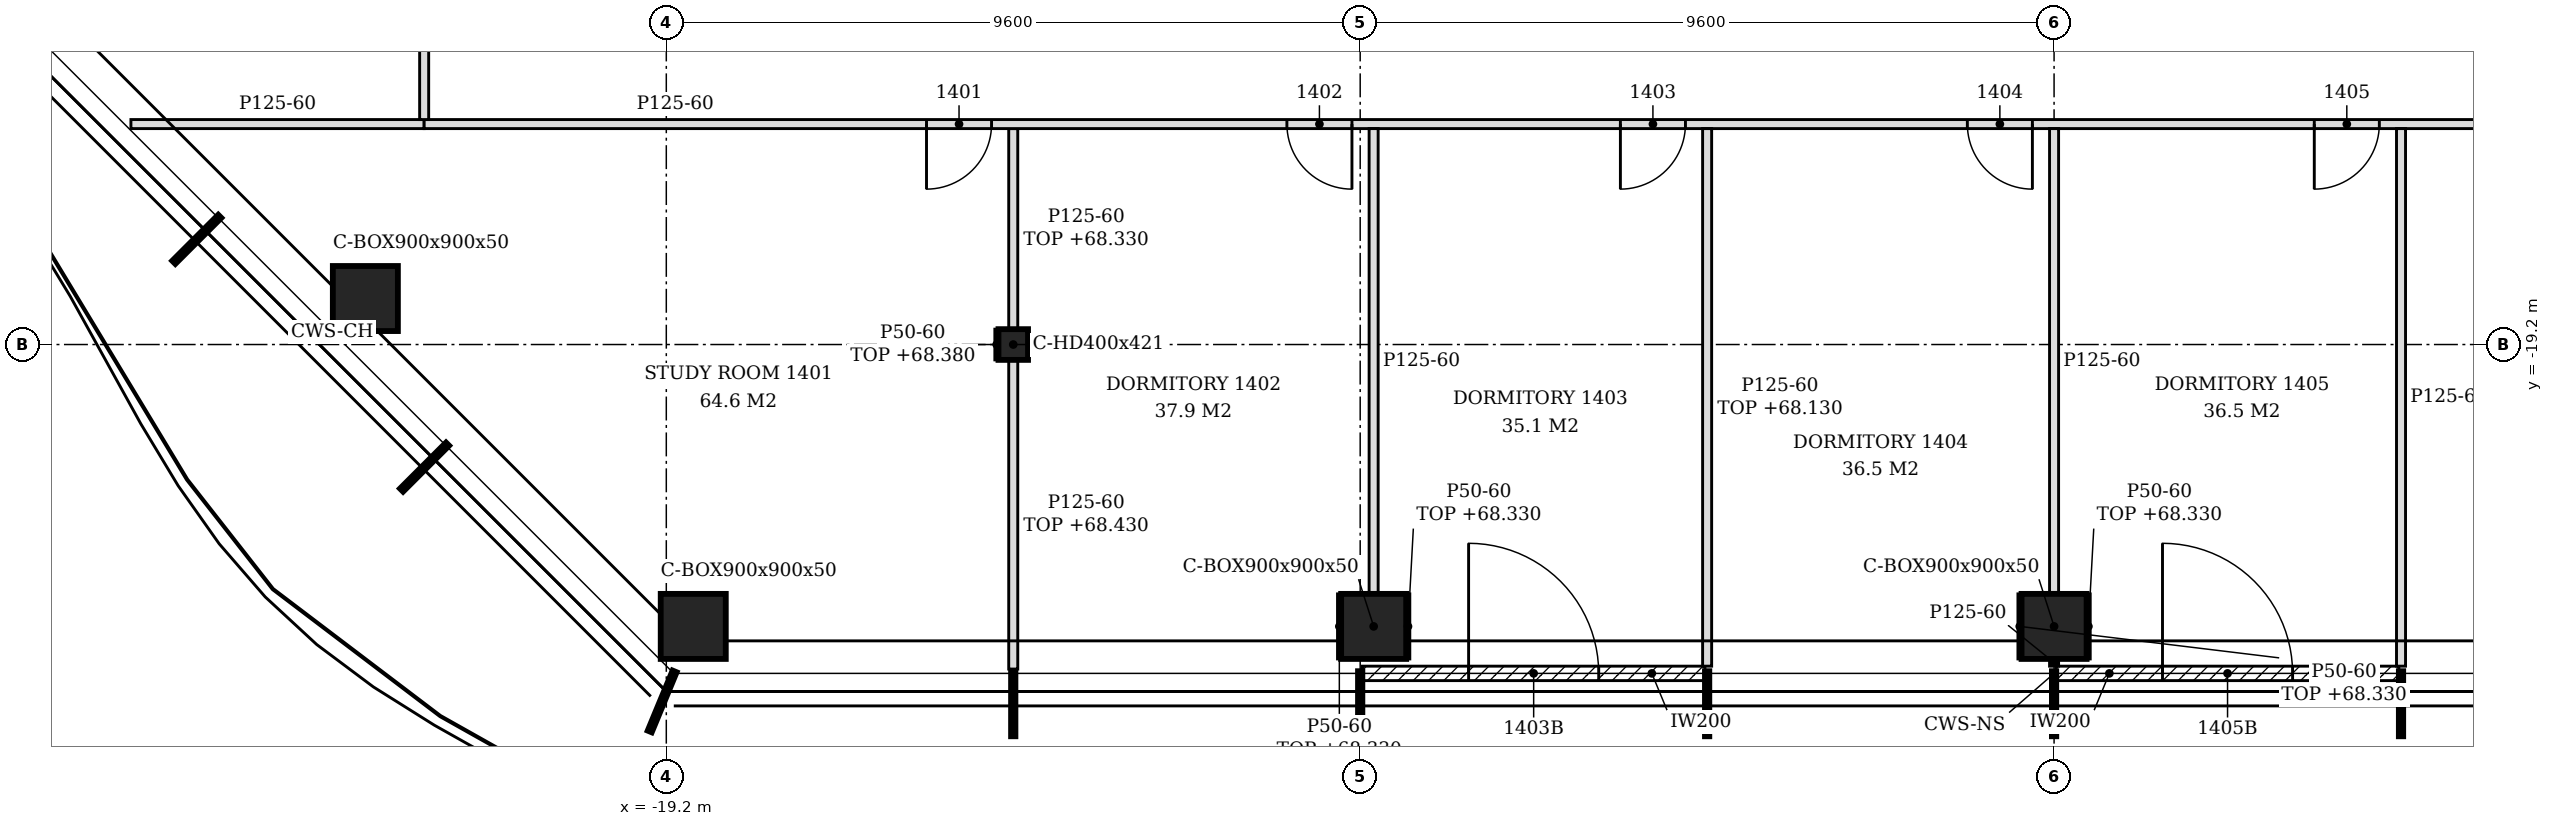
"""IFC4 building model, lengths in metres.
Left out: names, types, materials, properties, quantities, classifications, styles, units other than length and angle.
Written with IfcOpenShell. Run it as: python <this file> out.ifc"""

import sys

from ifc_helpers import new_model, si_unit, direction, frame, frame_2d, origin, origin_2d, place, context, subcontext, project, spatial, polyline, rectangle, hollow_rectangle, i_section, outline, extrude, element, fill, save


model = new_model("IFC4")
c1 = context("Model", 3, precision=1e-05, world=origin(), true_north=direction((0.0, 1.0)))
c2 = subcontext(c1, "Body", "Model", "MODEL_VIEW")
j1 = project(units=[si_unit("LENGTHUNIT", "METRE"), si_unit("PLANEANGLEUNIT", "RADIAN")], contexts=[c1])
p1 = place(None, origin())
s1 = spatial("IfcSite", under=j1, at=p1, CompositionType="ELEMENT")
p2 = place(p1, origin())
s2 = spatial("IfcBuilding", under=s1, at=p2, CompositionType="ELEMENT")
p3 = place(p2, frame((0.0, 0.0, 65.4)))
s3 = spatial("IfcBuildingStorey", under=s2, at=p3, CompositionType="ELEMENT", Elevation=65.4)
for number, where, z_axis, x_axis in (
    (1, (-18.827, -23.1, -0.15), (0.0, 0.0, 1.0), (1.0, 0.0, 0.0)),
    (2, (-9.414, -23.1, -0.15), (0.0, 0.0, 1.0), (1.0, 0.0, 0.0)),
    (3, (0.0, -23.1, -0.15), (0.0, 0.0, 1.0), (1.0, 0.0, 0.0)),
    (4, (-23.364, -18.564, -0.15), (0.0, 0.0, 1.0), (1.0, 0.0, 0.0)),
):
    element("IfcColumn", number, at=place(p3, frame(where, z_axis=z_axis, x_axis=x_axis)), inside=s3, PredefinedType="COLUMN", context=c2, shape_type="SweptSolid", body=[
        extrude(hollow_rectangle(XDim=0.9, YDim=0.9, WallThickness=0.05, at=origin_2d()), origin(), (0.0, 0.0, 1.0), 3.6),
    ])
p4 = place(p3, frame((-14.4, -19.2, -0.15), z_axis=(0.0, 0.0, 1.0), x_axis=(1.0, 0.0, 0.0)))
e5 = element("IfcColumn", 5, at=p4, inside=s3, PredefinedType="COLUMN", context=c2, shape_type="SweptSolid", body=[
    extrude(i_section(OverallWidth=0.409, OverallDepth=0.425, WebThickness=0.033, FlangeThickness=0.052, FilletRadius=0.015, at=origin_2d()), origin(), (0.0, 0.0, 1.0), 3.6),
])
p5 = place(p3, frame((-9.57, -23.75, 0.0), z_axis=(0.0, 0.0, 1.0), x_axis=(1.0, 0.0, 0.0)))
e6 = element("IfcWall", 6, at=p5, inside=s3, PredefinedType="NOTDEFINED", context=c2, shape_type="SweptSolid", body=[
    extrude(rectangle(XDim=4.74, YDim=0.2, at=frame_2d((2.37, 0.0))), origin(), (0.0, 0.0, 1.0), 3.45),
])
p6 = place(p5, frame((1.47, 0.0, 0.0)))
e7 = element("IfcOpeningElement", 7, at=p6, cuts=e6, PredefinedType="OPENING", context=c2, shape_type="SweptSolid", body=[
    extrude(rectangle(XDim=1.8, YDim=2.4, at=frame_2d((0.9, 1.2))), frame((0.0, 0.11, 0.0), z_axis=(0.0, -1.0, 0.0), x_axis=(1.0, 0.0, 0.0)), (0.0, 0.0, 1.0), 0.22),
])
p7 = place(p3, frame((0.03, -23.75, 0.0), z_axis=(0.0, 0.0, 1.0), x_axis=(1.0, 0.0, 0.0)))
e8 = element("IfcWall", 8, at=p7, inside=s3, PredefinedType="NOTDEFINED", context=c2, shape_type="SweptSolid", body=[
    extrude(rectangle(XDim=4.74, YDim=0.2, at=frame_2d((2.37, 0.0))), origin(), (0.0, 0.0, 1.0), 3.45),
])
p8 = place(p7, frame((1.47, 0.0, 0.0)))
e9 = element("IfcOpeningElement", 9, at=p8, cuts=e8, PredefinedType="OPENING", context=c2, shape_type="SweptSolid", body=[
    extrude(rectangle(XDim=1.8, YDim=2.4, at=frame_2d((0.9, 1.2))), frame((0.0, 0.11, 0.0), z_axis=(0.0, -1.0, 0.0), x_axis=(1.0, 0.0, 0.0)), (0.0, 0.0, 1.0), 0.22),
])
p9 = place(p3, frame((-14.4, -23.69, 0.0), z_axis=(0.0, 0.0, 1.0), x_axis=(0.0, 1.0, 0.0)))
e10 = element("IfcWall", 10, at=p9, inside=s3, PredefinedType="PARTITIONING", context=c2, shape_type="SweptSolid", body=[
    extrude(outline(polyline([(0.0, 0.0), (4.277, 0.0), (4.278, 3.03), (0.74, 3.03), (0.738, 2.93), (0.44, 2.93), (0.438, 3.03), (0.0, 3.03), (0.0, 0.0)])), frame((0.0, 0.062, 0.0), z_axis=(0.0, -1.0, 0.0), x_axis=(1.0, 0.0, 0.0)), (0.0, 0.0, 1.0), 0.125),
])
p10 = place(p3, frame((-4.8, -23.65, 0.0), z_axis=(0.0, 0.0, 1.0), x_axis=(0.0, 1.0, 0.0)))
e11 = element("IfcWall", 11, at=p10, inside=s3, PredefinedType="PARTITIONING", context=c2, shape_type="SweptSolid", body=[
    extrude(rectangle(XDim=7.438, YDim=0.125, at=frame_2d((3.719, 0.0))), origin(), (0.0, 0.0, 1.0), 2.73),
])
p11 = place(p3, frame((0.0, -23.65, 0.0), z_axis=(0.0, 0.0, 1.0), x_axis=(0.0, 1.0, 0.0)))
e12 = element("IfcWall", 12, at=p11, inside=s3, PredefinedType="PARTITIONING", context=c2, shape_type="SweptSolid", body=[
    extrude(rectangle(XDim=0.1, YDim=0.125, at=frame_2d((0.05, 0.0))), origin(), (0.0, 0.0, 1.0), 3.45),
])
p12 = place(p3, frame((4.8, -23.65, 0.0), z_axis=(0.0, 0.0, 1.0), x_axis=(0.0, 1.0, 0.0)))
e13 = element("IfcWall", 13, at=p12, inside=s3, PredefinedType="PARTITIONING", context=c2, shape_type="SweptSolid", body=[
    extrude(outline(polyline([(0.0, 0.0), (7.438, 0.0), (7.438, 3.45), (4.555, 3.45), (4.553, 2.88), (4.345, 2.88), (4.343, 3.45), (0.7, 3.45), (0.698, 2.93), (0.4, 2.93), (0.398, 3.45), (0.0, 3.45), (0.0, 0.0)])), frame((0.0, 0.062, 0.0), z_axis=(0.0, -1.0, 0.0), x_axis=(1.0, 0.0, 0.0)), (0.0, 0.0, 1.0), 0.125),
])
p13 = place(p3, frame((0.0, -22.65, 0.0), z_axis=(0.0, 0.0, 1.0), x_axis=(0.0, 1.0, 0.0)))
e14 = element("IfcWall", 14, at=p13, inside=s3, PredefinedType="PARTITIONING", context=c2, shape_type="SweptSolid", body=[
    extrude(outline(polyline([(0.0, 0.0), (6.438, 0.0), (6.438, 3.45), (3.555, 3.45), (3.553, 2.88), (3.345, 2.88), (3.343, 3.45), (0.0, 3.45), (0.0, 0.0)])), frame((0.0, 0.062, 0.0), z_axis=(0.0, -1.0, 0.0), x_axis=(1.0, 0.0, 0.0)), (0.0, 0.0, 1.0), 0.125),
])
p14 = place(p3, frame((-9.414, -22.65, 0.0), z_axis=(0.0, 0.0, 1.0), x_axis=(0.0, 1.0, 0.0)))
e15 = element("IfcWall", 15, at=p14, inside=s3, PredefinedType="PARTITIONING", context=c2, shape_type="SweptSolid", body=[
    extrude(outline(polyline([(0.0, 0.0), (6.438, 0.0), (6.438, 3.45), (3.55, 3.45), (3.548, 2.93), (3.35, 2.93), (3.348, 3.45), (0.0, 3.45), (0.0, 0.0)])), frame((0.0, 0.062, 0.0), z_axis=(0.0, -1.0, 0.0), x_axis=(1.0, 0.0, 0.0)), (0.0, 0.0, 1.0), 0.125),
])
p15 = place(p3, frame((-14.4, -18.988, 0.0), z_axis=(0.0, 0.0, 1.0), x_axis=(0.0, 1.0, 0.0)))
e16 = element("IfcWall", 16, at=p15, inside=s3, PredefinedType="PARTITIONING", context=c2, shape_type="SweptSolid", body=[
    extrude(rectangle(XDim=2.775, YDim=0.125, at=frame_2d((1.388, 0.0))), origin(), (0.0, 0.0, 1.0), 2.93),
])
p16 = place(p3, frame((-26.607, -16.15, 0.0), z_axis=(0.0, 0.0, 1.0), x_axis=(1.0, 0.0, 0.0)))
e17 = element("IfcWall", 17, at=p16, inside=s3, PredefinedType="PARTITIONING", context=c2, shape_type="SweptSolid", body=[
    extrude(outline(polyline([(0.0, 0.0), (4.057, 0.0), (4.057, 3.45), (1.104, 3.45), (1.102, 2.93), (0.555, 2.93), (0.553, 3.45), (0.0, 3.45), (0.0, 0.0)])), frame((0.0, 0.062, 0.0), z_axis=(0.0, -1.0, 0.0), x_axis=(1.0, 0.0, 0.0)), (0.0, 0.0, 1.0), 0.125),
])
p17 = place(p3, frame((-22.55, -16.15, 0.0), z_axis=(0.0, 0.0, 1.0), x_axis=(1.0, 0.0, 0.0)))
e18 = element("IfcWall", 18, at=p17, inside=s3, PredefinedType="PARTITIONING", context=c2, shape_type="SweptSolid", body=[
    extrude(outline(polyline([(0.0, 0.0), (41.688, 0.0), (41.688, 2.73), (41.6, 2.73), (41.598, 3.45), (29.9, 3.45), (29.898, 2.73), (29.6, 2.73), (29.598, 3.45), (17.9, 3.45), (17.898, 2.73), (17.6, 2.73), (17.598, 3.45), (8.3, 3.45), (8.298, 2.93), (8.0, 2.93), (7.998, 3.45), (0.0, 3.45), (0.0, 0.0)])), frame((0.0, 0.062, 0.0), z_axis=(0.0, -1.0, 0.0), x_axis=(1.0, 0.0, 0.0)), (0.0, 0.0, 1.0), 0.125),
])
p18 = place(p17, frame((6.95, 0.0, 0.0)))
e19 = element("IfcOpeningElement", 19, at=p18, cuts=e18, PredefinedType="OPENING", context=c2, shape_type="SweptSolid", body=[
    extrude(rectangle(XDim=0.9, YDim=2.1, at=frame_2d((0.45, 1.05))), frame((0.0, 0.073, 0.0), z_axis=(0.0, -1.0, 0.0), x_axis=(1.0, 0.0, 0.0)), (0.0, 0.0, 1.0), 0.145),
])
p19 = place(p17, frame((11.936, 0.0, 0.0)))
e20 = element("IfcOpeningElement", 20, at=p19, cuts=e18, PredefinedType="OPENING", context=c2, shape_type="SweptSolid", body=[
    extrude(rectangle(XDim=0.9, YDim=2.1, at=frame_2d((0.45, 1.05))), frame((0.0, 0.073, 0.0), z_axis=(0.0, -1.0, 0.0), x_axis=(1.0, 0.0, 0.0)), (0.0, 0.0, 1.0), 0.145),
])
p20 = place(p17, frame((16.55, 0.0, 0.0)))
e21 = element("IfcOpeningElement", 21, at=p20, cuts=e18, PredefinedType="OPENING", context=c2, shape_type="SweptSolid", body=[
    extrude(rectangle(XDim=0.9, YDim=2.1, at=frame_2d((0.45, 1.05))), frame((0.0, 0.073, 0.0), z_axis=(0.0, -1.0, 0.0), x_axis=(1.0, 0.0, 0.0)), (0.0, 0.0, 1.0), 0.145),
])
p21 = place(p17, frame((21.35, 0.0, 0.0)))
e22 = element("IfcOpeningElement", 22, at=p21, cuts=e18, PredefinedType="OPENING", context=c2, shape_type="SweptSolid", body=[
    extrude(rectangle(XDim=0.9, YDim=2.1, at=frame_2d((0.45, 1.05))), frame((0.0, 0.073, 0.0), z_axis=(0.0, -1.0, 0.0), x_axis=(1.0, 0.0, 0.0)), (0.0, 0.0, 1.0), 0.145),
])
p22 = place(p17, frame((26.15, 0.0, 0.0)))
e23 = element("IfcOpeningElement", 23, at=p22, cuts=e18, PredefinedType="OPENING", context=c2, shape_type="SweptSolid", body=[
    extrude(rectangle(XDim=0.9, YDim=2.1, at=frame_2d((0.45, 1.05))), frame((0.0, 0.073, 0.0), z_axis=(0.0, -1.0, 0.0), x_axis=(1.0, 0.0, 0.0)), (0.0, 0.0, 1.0), 0.145),
])
p23 = place(p17, frame((30.764, 0.0, 0.0)))
e24 = element("IfcOpeningElement", 24, at=p23, cuts=e18, PredefinedType="OPENING", context=c2, shape_type="SweptSolid", body=[
    extrude(rectangle(XDim=0.9, YDim=2.1, at=frame_2d((0.45, 1.05))), frame((0.0, 0.073, 0.0), z_axis=(0.0, -1.0, 0.0), x_axis=(1.0, 0.0, 0.0)), (0.0, 0.0, 1.0), 0.145),
])
p24 = place(p17, frame((32.35, 0.0, 0.0)))
e25 = element("IfcOpeningElement", 25, at=p24, cuts=e18, PredefinedType="OPENING", context=c2, shape_type="SweptSolid", body=[
    extrude(rectangle(XDim=0.9, YDim=2.1, at=frame_2d((0.45, 1.05))), frame((0.0, 0.073, 0.0), z_axis=(0.0, -1.0, 0.0), x_axis=(1.0, 0.0, 0.0)), (0.0, 0.0, 1.0), 0.145),
])
p25 = place(p17, frame((37.25, 0.0, 0.0)))
e26 = element("IfcOpeningElement", 26, at=p25, cuts=e18, PredefinedType="OPENING", context=c2, shape_type="SweptSolid", body=[
    extrude(rectangle(XDim=0.9, YDim=2.1, at=frame_2d((0.45, 1.05))), frame((0.0, 0.073, 0.0), z_axis=(0.0, -1.0, 0.0), x_axis=(1.0, 0.0, 0.0)), (0.0, 0.0, 1.0), 0.145),
])
p26 = place(p3, frame((-22.55, -16.087, 0.0), z_axis=(0.0, 0.0, 1.0), x_axis=(0.0, 1.0, 0.0)))
e27 = element("IfcWall", 27, at=p26, inside=s3, PredefinedType="PARTITIONING", context=c2, shape_type="SweptSolid", body=[
    extrude(outline(polyline([(0.0, 0.0), (36.276, 0.0), (36.276, 3.45), (36.022, 3.45), (36.02, 2.63), (34.907, 2.63), (34.905, 3.45), (30.597, 3.45), (30.595, 2.83), (30.377, 2.83), (30.375, 3.45), (25.798, 3.45), (25.795, 2.83), (25.577, 2.83), (25.575, 3.45), (20.998, 3.45), (20.996, 2.83), (20.778, 2.83), (20.775, 3.45), (16.198, 3.45), (16.196, 2.83), (15.978, 2.83), (15.976, 3.45), (11.397, 3.45), (11.396, 2.83), (11.177, 2.83), (11.176, 3.45), (6.597, 3.45), (6.595, 2.83), (6.377, 2.83), (6.375, 3.45), (1.798, 3.45), (1.795, 2.83), (1.577, 2.83), (1.575, 3.45), (0.0, 3.45), (0.0, 0.0)])), frame((0.0, 0.062, 0.0), z_axis=(0.0, -1.0, 0.0), x_axis=(1.0, 0.0, 0.0)), (0.0, 0.0, 1.0), 0.125),
])
p27 = place(p26, frame((10.137, 0.0, 0.0)))
e28 = element("IfcOpeningElement", 28, at=p27, cuts=e27, PredefinedType="OPENING", context=c2, shape_type="SweptSolid", body=[
    extrude(rectangle(XDim=0.9, YDim=2.1, at=frame_2d((0.45, 1.05))), frame((0.0, 0.073, 0.0), z_axis=(0.0, -1.0, 0.0), x_axis=(1.0, 0.0, 0.0)), (0.0, 0.0, 1.0), 0.145),
])
p28 = place(p26, frame((11.711, 0.0, 0.0)))
e29 = element("IfcOpeningElement", 29, at=p28, cuts=e27, PredefinedType="OPENING", context=c2, shape_type="SweptSolid", body=[
    extrude(rectangle(XDim=0.9, YDim=2.1, at=frame_2d((0.45, 1.05))), frame((0.0, 0.073, 0.0), z_axis=(0.0, -1.0, 0.0), x_axis=(1.0, 0.0, 0.0)), (0.0, 0.0, 1.0), 0.145),
])
p29 = place(p26, frame((17.288, 0.0, 0.0)))
e30 = element("IfcOpeningElement", 30, at=p29, cuts=e27, PredefinedType="OPENING", context=c2, shape_type="SweptSolid", body=[
    extrude(rectangle(XDim=0.9, YDim=2.1, at=frame_2d((0.45, 1.05))), frame((0.0, 0.073, 0.0), z_axis=(0.0, -1.0, 0.0), x_axis=(1.0, 0.0, 0.0)), (0.0, 0.0, 1.0), 0.145),
])
p30 = place(p26, frame((21.063, 0.0, 0.0)))
e31 = element("IfcOpeningElement", 31, at=p30, cuts=e27, PredefinedType="OPENING", context=c2, shape_type="SweptSolid", body=[
    extrude(rectangle(XDim=0.9, YDim=2.1, at=frame_2d((0.45, 1.05))), frame((0.0, 0.073, 0.0), z_axis=(0.0, -1.0, 0.0), x_axis=(1.0, 0.0, 0.0)), (0.0, 0.0, 1.0), 0.145),
])
p31 = place(p26, frame((27.188, 0.0, 0.0)))
e32 = element("IfcOpeningElement", 32, at=p31, cuts=e27, PredefinedType="OPENING", context=c2, shape_type="SweptSolid", body=[
    extrude(rectangle(XDim=0.9, YDim=2.1, at=frame_2d((0.45, 1.05))), frame((0.0, 0.073, 0.0), z_axis=(0.0, -1.0, 0.0), x_axis=(1.0, 0.0, 0.0)), (0.0, 0.0, 1.0), 0.145),
])
p32 = place(p26, frame((30.415, 0.0, 0.0)))
e33 = element("IfcOpeningElement", 33, at=p32, cuts=e27, PredefinedType="OPENING", context=c2, shape_type="SweptSolid", body=[
    extrude(rectangle(XDim=0.9, YDim=2.1, at=frame_2d((0.45, 1.05))), frame((0.0, 0.073, 0.0), z_axis=(0.0, -1.0, 0.0), x_axis=(1.0, 0.0, 0.0)), (0.0, 0.0, 1.0), 0.145),
])
p33 = place(p3, frame((-14.629, -19.413, 0.0), z_axis=(0.0, 0.0, 1.0), x_axis=(0.0, 1.0, 0.0)))
e34 = element("IfcWall", 34, at=p33, inside=s3, PredefinedType="PARTITIONING", context=c2, shape_type="SweptSolid", body=[
    extrude(rectangle(XDim=0.425, YDim=0.05, at=frame_2d((0.212, 0.0))), origin(), (0.0, 0.0, 1.0), 2.98),
])
for number, where, z_axis, x_axis in (
    (35, (-0.475, -23.55, 0.0), (0.0, 0.0, 1.0), (0.0, 1.0, 0.0)),
    (36, (0.475, -23.55, 0.0), (0.0, 0.0, 1.0), (0.0, 1.0, 0.0)),
    (37, (-9.889, -23.55, 0.0), (0.0, 0.0, 1.0), (0.0, 1.0, 0.0)),
    (38, (-8.939, -23.55, 0.0), (0.0, 0.0, 1.0), (0.0, 1.0, 0.0)),
):
    element("IfcWall", number, at=place(p3, frame(where, z_axis=z_axis, x_axis=x_axis)), inside=s3, PredefinedType="PARTITIONING", context=c2, shape_type="SweptSolid", body=[
        extrude(rectangle(XDim=0.9, YDim=0.05, at=frame_2d((0.45, 0.0))), origin(), (0.0, 0.0, 1.0), 2.93),
    ])
p34 = place(p6, origin())
e39 = element("IfcDoor", 39, at=p34, inside=s3, OperationType="SINGLE_SWING_LEFT", PredefinedType="DOOR", context=c2, shape_type="SweptSolid", body=[
    extrude(rectangle(XDim=1.8, YDim=2.4, at=frame_2d((0.9, 1.2))), frame((0.0, 0.025, 0.0), z_axis=(0.0, -1.0, 0.0), x_axis=(1.0, 0.0, 0.0)), (0.0, 0.0, 1.0), 0.05),
])
fill(e7, e39)
p35 = place(p8, origin())
e40 = element("IfcDoor", 40, at=p35, inside=s3, OperationType="SINGLE_SWING_LEFT", PredefinedType="DOOR", context=c2, shape_type="SweptSolid", body=[
    extrude(rectangle(XDim=1.8, YDim=2.4, at=frame_2d((0.9, 1.2))), frame((0.0, 0.025, 0.0), z_axis=(0.0, -1.0, 0.0), x_axis=(1.0, 0.0, 0.0)), (0.0, 0.0, 1.0), 0.05),
])
fill(e9, e40)
p36 = place(p18, frame((0.9, 0.0, 0.0), z_axis=(0.0, 0.0, 1.0), x_axis=(-1.0, 0.0, 0.0)))
e41 = element("IfcDoor", 41, at=p36, inside=s3, OperationType="SINGLE_SWING_RIGHT", PredefinedType="DOOR", context=c2, shape_type="SweptSolid", body=[
    extrude(rectangle(XDim=0.9, YDim=2.1, at=frame_2d((0.45, 1.05))), frame((0.0, 0.025, 0.0), z_axis=(0.0, -1.0, 0.0), x_axis=(1.0, 0.0, 0.0)), (0.0, 0.0, 1.0), 0.05),
])
fill(e19, e41)
p37 = place(p19, frame((0.9, 0.0, 0.0), z_axis=(0.0, 0.0, 1.0), x_axis=(-1.0, 0.0, 0.0)))
e42 = element("IfcDoor", 42, at=p37, inside=s3, OperationType="SINGLE_SWING_LEFT", PredefinedType="DOOR", context=c2, shape_type="SweptSolid", body=[
    extrude(rectangle(XDim=0.9, YDim=2.1, at=frame_2d((0.45, 1.05))), frame((0.0, 0.025, 0.0), z_axis=(0.0, -1.0, 0.0), x_axis=(1.0, 0.0, 0.0)), (0.0, 0.0, 1.0), 0.05),
])
fill(e20, e42)
p38 = place(p20, frame((0.9, 0.0, 0.0), z_axis=(0.0, 0.0, 1.0), x_axis=(-1.0, 0.0, 0.0)))
e43 = element("IfcDoor", 43, at=p38, inside=s3, OperationType="SINGLE_SWING_RIGHT", PredefinedType="DOOR", context=c2, shape_type="SweptSolid", body=[
    extrude(rectangle(XDim=0.9, YDim=2.1, at=frame_2d((0.45, 1.05))), frame((0.0, 0.025, 0.0), z_axis=(0.0, -1.0, 0.0), x_axis=(1.0, 0.0, 0.0)), (0.0, 0.0, 1.0), 0.05),
])
fill(e21, e43)
p39 = place(p21, frame((0.9, 0.0, 0.0), z_axis=(0.0, 0.0, 1.0), x_axis=(-1.0, 0.0, 0.0)))
e44 = element("IfcDoor", 44, at=p39, inside=s3, OperationType="SINGLE_SWING_LEFT", PredefinedType="DOOR", context=c2, shape_type="SweptSolid", body=[
    extrude(rectangle(XDim=0.9, YDim=2.1, at=frame_2d((0.45, 1.05))), frame((0.0, 0.025, 0.0), z_axis=(0.0, -1.0, 0.0), x_axis=(1.0, 0.0, 0.0)), (0.0, 0.0, 1.0), 0.05),
])
fill(e22, e44)
p40 = place(p22, frame((0.9, 0.0, 0.0), z_axis=(0.0, 0.0, 1.0), x_axis=(-1.0, 0.0, 0.0)))
e45 = element("IfcDoor", 45, at=p40, inside=s3, OperationType="SINGLE_SWING_RIGHT", PredefinedType="DOOR", context=c2, shape_type="SweptSolid", body=[
    extrude(rectangle(XDim=0.9, YDim=2.1, at=frame_2d((0.45, 1.05))), frame((0.0, 0.025, 0.0), z_axis=(0.0, -1.0, 0.0), x_axis=(1.0, 0.0, 0.0)), (0.0, 0.0, 1.0), 0.05),
])
fill(e23, e45)
save(model, sys.argv[1])
